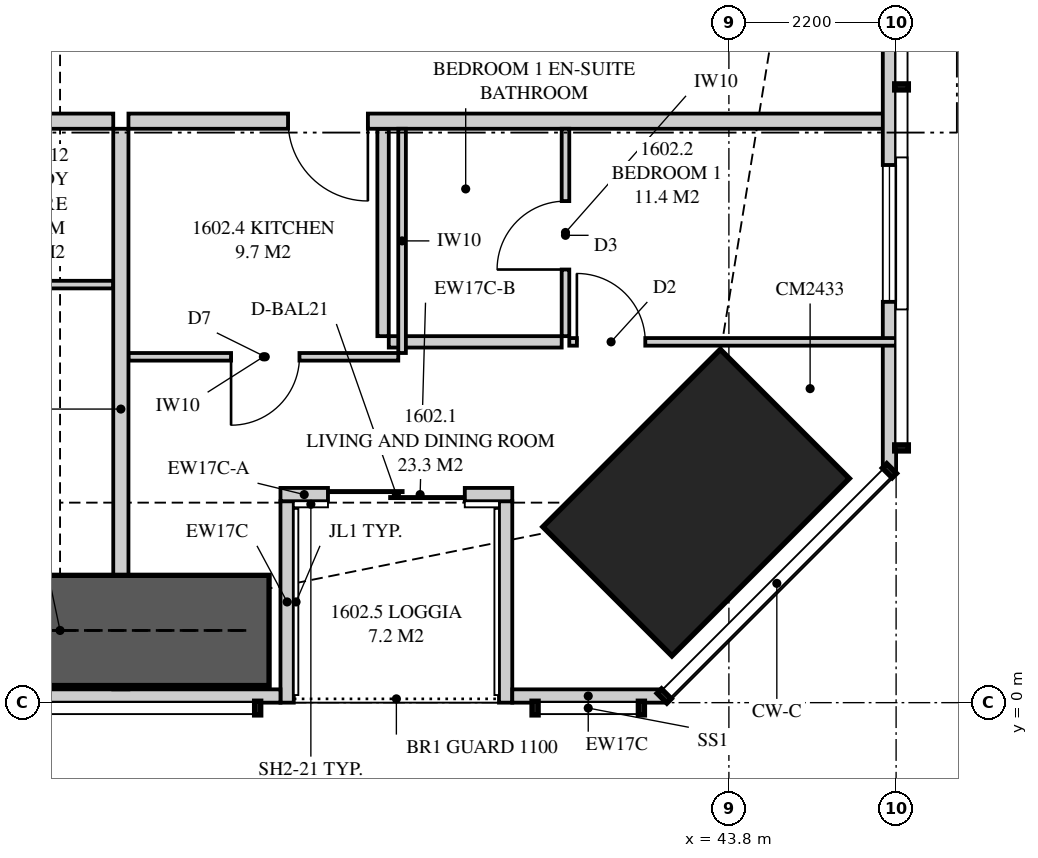
"""IFC4 building model, lengths in metres.
Left out: names, types, materials, properties, quantities, classifications, styles, units other than length and angle.
Written with IfcOpenShell. Run it as: python <this file> out.ifc"""

import sys

from ifc_helpers import new_model, si_unit, direction, frame, frame_2d, origin, origin_2d, place, context, subcontext, project, spatial, polyline, rectangle, outline, extrude, element, fill, save


model = new_model("IFC4")
c1 = context("Model", 3, precision=1e-05, world=origin(), true_north=direction((0.0, 1.0)))
c2 = subcontext(c1, "Body", "Model", "MODEL_VIEW")
j1 = project(units=[si_unit("LENGTHUNIT", "METRE"), si_unit("PLANEANGLEUNIT", "RADIAN")], contexts=[c1])
p1 = place(None, origin())
s1 = spatial("IfcSite", under=j1, at=p1, CompositionType="ELEMENT")
p2 = place(p1, origin())
s2 = spatial("IfcBuilding", under=s1, at=p2, CompositionType="ELEMENT")
p3 = place(p2, frame((0.0, 0.0, 61.2)))
s3 = spatial("IfcBuildingStorey", under=s2, at=p3, CompositionType="ELEMENT", Elevation=61.2)
p4 = place(p3, frame((43.369, 2.631, 0.0), z_axis=(0.0, 0.0, 1.0), x_axis=(-0.707106781187, 0.707106781187, 0.0)))
e1 = element("IfcColumn", 1, at=p4, inside=s3, PredefinedType="COLUMN", context=c2, shape_type="SweptSolid", body=[
    extrude(rectangle(XDim=2.4, YDim=3.3, at=origin_2d()), origin(), (0.0, 0.0, 1.0), 3.35),
])
p5 = place(p3, frame((29.85, 0.087, 0.0), z_axis=(0.0, 0.0, 1.0), x_axis=(1.0, 0.0, 0.0)))
e2 = element("IfcWall", 2, at=p5, inside=s3, PredefinedType="SOLIDWALL", context=c2, shape_type="SweptSolid", body=[
    extrude(outline(polyline([(0.0, 0.0), (8.05, 0.0), (8.05, 3.11), (5.354, 3.11), (5.354, 2.15), (5.306, 2.15), (5.306, 3.11), (5.15, 3.11), (5.15, 2.15), (0.0, 2.15), (0.0, 0.0)])), frame((0.0, 0.087, 0.0), z_axis=(0.0, -1.0, 0.0), x_axis=(1.0, 0.0, 0.0)), (0.0, 0.0, 1.0), 0.175),
])
p6 = place(p5, frame((0.45, 0.0, 0.4)))
e3 = element("IfcOpeningElement", 3, at=p6, cuts=e2, PredefinedType="OPENING", context=c2, shape_type="SweptSolid", body=[
    extrude(rectangle(XDim=1.8, YDim=1.7, at=frame_2d((0.9, 0.85))), frame((0.0, 0.097, 0.0), z_axis=(0.0, -1.0, 0.0), x_axis=(1.0, 0.0, 0.0)), (0.0, 0.0, 1.0), 0.195),
])
p7 = place(p3, frame((40.95, 0.087, 0.0), z_axis=(0.0, 0.0, 1.0), x_axis=(1.0, 0.0, 0.0)))
e4 = element("IfcWall", 4, at=p7, inside=s3, PredefinedType="SOLIDWALL", context=c2, shape_type="SweptSolid", body=[
    extrude(rectangle(XDim=1.999, YDim=0.175, at=frame_2d((1.0, 0.0))), origin(), (0.0, 0.0, 1.0), 3.11),
])
p8 = place(p3, frame((37.9, 2.738, 0.0), z_axis=(0.0, 0.0, 1.0), x_axis=(1.0, 0.0, 0.0)))
e5 = element("IfcWall", 5, at=p8, inside=s3, PredefinedType="SOLIDWALL", context=c2, shape_type="SweptSolid", body=[
    extrude(rectangle(XDim=0.625, YDim=0.175, at=frame_2d((0.312, 0.0))), origin(), (0.0, 0.0, 1.0), 2.51),
])
p9 = place(p3, frame((38.525, 2.738, 0.0), z_axis=(0.0, 0.0, 1.0), x_axis=(1.0, 0.0, 0.0)))
e6 = element("IfcWall", 6, at=p9, inside=s3, PredefinedType="SOLIDWALL", context=c2, shape_type="SweptSolid", body=[
    extrude(rectangle(XDim=2.425, YDim=0.175, at=frame_2d((1.212, 0.0))), origin(), (0.0, 0.0, 1.0), 2.15),
])
p10 = place(p9, origin())
e7 = element("IfcOpeningElement", 7, at=p10, cuts=e6, PredefinedType="OPENING", context=c2, shape_type="SweptSolid", body=[
    extrude(rectangle(XDim=1.8, YDim=2.1, at=frame_2d((0.9, 1.05))), frame((0.0, 0.097, 0.0), z_axis=(0.0, -1.0, 0.0), x_axis=(1.0, 0.0, 0.0)), (0.0, 0.0, 1.0), 0.195),
])
p11 = place(p3, frame((37.988, 0.0, 0.0), z_axis=(0.0, 0.0, 1.0), x_axis=(0.0, 1.0, 0.0)))
e8 = element("IfcWall", 8, at=p11, inside=s3, PredefinedType="SOLIDWALL", context=c2, shape_type="SweptSolid", body=[
    extrude(outline(polyline([(0.0, 0.0), (2.65, 0.0), (2.65, 2.51), (2.384, 2.51), (2.384, 2.15), (0.717, 2.15), (0.717, 3.11), (0.0, 3.11), (0.0, 0.0)])), frame((0.0, 0.087, 0.0), z_axis=(0.0, -1.0, 0.0), x_axis=(1.0, 0.0, 0.0)), (0.0, 0.0, 1.0), 0.175),
])
p12 = place(p3, frame((40.863, 0.0, 0.0), z_axis=(0.0, 0.0, 1.0), x_axis=(0.0, 1.0, 0.0)))
e9 = element("IfcWall", 9, at=p12, inside=s3, PredefinedType="SOLIDWALL", context=c2, shape_type="SweptSolid", body=[
    extrude(outline(polyline([(0.0, 0.0), (2.65, 0.0), (2.65, 2.15), (1.294, 2.15), (1.294, 3.11), (0.0, 3.11), (0.0, 0.0)])), frame((0.0, 0.087, 0.0), z_axis=(0.0, -1.0, 0.0), x_axis=(1.0, 0.0, 0.0)), (0.0, 0.0, 1.0), 0.175),
])
p13 = place(p3, frame((45.913, 3.051, 0.0), z_axis=(0.0, 0.0, 1.0), x_axis=(0.0, 1.0, 0.0)))
e10 = element("IfcWall", 10, at=p13, inside=s3, PredefinedType="SOLIDWALL", context=c2, shape_type="SweptSolid", body=[
    extrude(outline(polyline([(0.0, 0.0), (31.897, 0.0), (31.897, 3.11), (22.167, 3.11), (22.167, 2.15), (22.074, 2.15), (22.074, 3.11), (21.949, 3.11), (21.949, 2.15), (9.949, 2.15), (9.949, 3.11), (9.823, 3.11), (9.823, 2.15), (9.73, 2.15), (9.73, 3.11), (0.0, 3.11), (0.0, 0.0)])), frame((0.0, 0.087, 0.0), z_axis=(0.0, -1.0, 0.0), x_axis=(1.0, 0.0, 0.0)), (0.0, 0.0, 1.0), 0.175),
])
p14 = place(p13, frame((2.222, 0.0, 0.4)))
e11 = element("IfcOpeningElement", 11, at=p14, cuts=e10, PredefinedType="OPENING", context=c2, shape_type="SweptSolid", body=[
    extrude(rectangle(XDim=1.8, YDim=1.7, at=frame_2d((0.9, 0.85))), frame((0.0, 0.097, 0.0), z_axis=(0.0, -1.0, 0.0), x_axis=(1.0, 0.0, 0.0)), (0.0, 0.0, 1.0), 0.195),
])
p15 = place(p13, frame((14.849, 0.0, 0.4)))
e12 = element("IfcOpeningElement", 12, at=p15, cuts=e10, PredefinedType="OPENING", context=c2, shape_type="SweptSolid", body=[
    extrude(rectangle(XDim=1.2, YDim=1.7, at=frame_2d((0.6, 0.85))), frame((0.0, 0.097, 0.0), z_axis=(0.0, -1.0, 0.0), x_axis=(1.0, 0.0, 0.0)), (0.0, 0.0, 1.0), 0.195),
])
p16 = place(p13, frame((27.375, 0.0, 0.4)))
e13 = element("IfcOpeningElement", 13, at=p16, cuts=e10, PredefinedType="OPENING", context=c2, shape_type="SweptSolid", body=[
    extrude(rectangle(XDim=1.8, YDim=1.7, at=frame_2d((0.9, 0.85))), frame((0.0, 0.097, 0.0), z_axis=(0.0, -1.0, 0.0), x_axis=(1.0, 0.0, 0.0)), (0.0, 0.0, 1.0), 0.195),
])
p17 = place(p3, frame((35.8, 0.175, 0.0), z_axis=(0.0, 0.0, 1.0), x_axis=(0.0, 1.0, 0.0)))
e14 = element("IfcWall", 14, at=p17, inside=s3, PredefinedType="PARTITIONING", context=c2, shape_type="SweptSolid", body=[
    extrude(outline(polyline([(0.008, 3.11), (0.0, 3.11), (0.0, 0.0), (0.529, 0.0), (0.529, 0.957), (1.021, 0.957), (1.021, 0.0), (7.375, 0.0), (7.375, 3.11), (3.766, 3.11), (3.766, 2.51), (1.864, 2.51), (1.864, 2.15), (1.021, 2.15), (1.021, 1.193), (0.529, 1.193), (0.529, 2.15), (0.008, 2.15), (0.008, 3.11)])), frame((0.0, 0.1, 0.0), z_axis=(0.0, -1.0, 0.0), x_axis=(1.0, 0.0, 0.0)), (0.0, 0.0, 1.0), 0.2),
])
p18 = place(p3, frame((35.9, 7.65, 0.0), z_axis=(0.0, 0.0, 1.0), x_axis=(1.0, 0.0, 0.0)))
e15 = element("IfcWall", 15, at=p18, inside=s3, PredefinedType="PARTITIONING", context=c2, shape_type="SweptSolid", body=[
    extrude(outline(polyline([(0.0, 0.0), (10.1, 0.0), (10.1, 3.11), (9.204, 3.11), (9.204, 2.15), (7.361, 2.15), (7.361, 3.11), (0.0, 3.11), (0.0, 0.0)])), frame((0.0, 0.1, 0.0), z_axis=(0.0, -1.0, 0.0), x_axis=(1.0, 0.0, 0.0)), (0.0, 0.0, 1.0), 0.2),
])
p19 = place(p18, frame((2.1, 0.0, 0.0)))
e16 = element("IfcOpeningElement", 16, at=p19, cuts=e15, PredefinedType="OPENING", context=c2, shape_type="SweptSolid", body=[
    extrude(rectangle(XDim=1.05, YDim=2.2, at=frame_2d((0.525, 1.1))), frame((0.0, 0.11, 0.0), z_axis=(0.0, -1.0, 0.0), x_axis=(1.0, 0.0, 0.0)), (0.0, 0.0, 1.0), 0.22),
])
p20 = place(p3, frame((41.65, 4.822, 0.0), z_axis=(0.0, 0.0, 1.0), x_axis=(0.0, 1.0, 0.0)))
e17 = element("IfcWall", 17, at=p20, inside=s3, PredefinedType="PARTITIONING", context=c2, shape_type="SweptSolid", body=[
    extrude(rectangle(XDim=2.728, YDim=0.1, at=frame_2d((1.364, 0.0))), origin(), (0.0, 0.0, 1.0), 3.11),
])
p21 = place(p20, frame((0.877, 0.0, 0.0)))
e18 = element("IfcOpeningElement", 18, at=p21, cuts=e17, PredefinedType="OPENING", context=c2, shape_type="SweptSolid", body=[
    extrude(rectangle(XDim=0.9, YDim=2.1, at=frame_2d((0.45, 1.05))), frame((0.0, 0.06, 0.0), z_axis=(0.0, -1.0, 0.0), x_axis=(1.0, 0.0, 0.0)), (0.0, 0.0, 1.0), 0.12),
])
p22 = place(p3, frame((41.7, 4.747, 0.0), z_axis=(0.0, 0.0, 1.0), x_axis=(1.0, 0.0, 0.0)))
e19 = element("IfcWall", 19, at=p22, inside=s3, PredefinedType="PARTITIONING", context=c2, shape_type="SweptSolid", body=[
    extrude(outline(polyline([(0.0, 0.0), (4.3, 0.0), (4.3, 3.11), (2.883, 3.11), (2.883, 2.15), (1.14, 2.15), (1.14, 3.11), (0.0, 3.11), (0.0, 0.0)])), frame((0.0, 0.05, 0.0), z_axis=(0.0, -1.0, 0.0), x_axis=(1.0, 0.0, 0.0)), (0.0, 0.0, 1.0), 0.1),
])
p23 = place(p22, frame((0.1, 0.0, 0.0)))
e20 = element("IfcOpeningElement", 20, at=p23, cuts=e19, PredefinedType="OPENING", context=c2, shape_type="SweptSolid", body=[
    extrude(rectangle(XDim=0.9, YDim=2.1, at=frame_2d((0.45, 1.05))), frame((0.0, 0.06, 0.0), z_axis=(0.0, -1.0, 0.0), x_axis=(1.0, 0.0, 0.0)), (0.0, 0.0, 1.0), 0.12),
])
p24 = place(p3, frame((39.325, 4.747, 0.0), z_axis=(0.0, 0.0, 1.0), x_axis=(1.0, 0.0, 0.0)))
e21 = element("IfcWall", 21, at=p24, inside=s3, PredefinedType="PLUMBINGWALL", context=c2, shape_type="SweptSolid", body=[
    extrude(rectangle(XDim=2.275, YDim=0.15, at=frame_2d((1.138, 0.0))), origin(), (0.0, 0.0, 1.0), 3.11),
])
p25 = place(p3, frame((39.25, 4.822, 0.0), z_axis=(0.0, 0.0, 1.0), x_axis=(0.0, 1.0, 0.0)))
e22 = element("IfcWall", 22, at=p25, inside=s3, PredefinedType="PLUMBINGWALL", context=c2, shape_type="SweptSolid", body=[
    extrude(rectangle(XDim=2.728, YDim=0.15, at=frame_2d((1.364, 0.0))), origin(), (0.0, 0.0, 1.0), 3.11),
])
p26 = place(p3, frame((35.9, 4.55, 0.0), z_axis=(0.0, 0.0, 1.0), x_axis=(1.0, 0.0, 0.0)))
e23 = element("IfcWall", 23, at=p26, inside=s3, PredefinedType="PARTITIONING", context=c2, shape_type="SweptSolid", body=[
    extrude(rectangle(XDim=3.55, YDim=0.1, at=frame_2d((1.775, 0.0))), origin(), (0.0, 0.0, 1.0), 3.11),
])
p27 = place(p26, frame((1.35, 0.0, 0.0)))
e24 = element("IfcOpeningElement", 24, at=p27, cuts=e23, PredefinedType="OPENING", context=c2, shape_type="SweptSolid", body=[
    extrude(rectangle(XDim=0.9, YDim=2.1, at=frame_2d((0.45, 1.05))), frame((0.0, 0.06, 0.0), z_axis=(0.0, -1.0, 0.0), x_axis=(1.0, 0.0, 0.0)), (0.0, 0.0, 1.0), 0.12),
])
p28 = place(p3, frame((39.5, 4.6, 0.0), z_axis=(0.0, 0.0, 1.0), x_axis=(0.0, 1.0, 0.0)))
e25 = element("IfcWall", 25, at=p28, inside=s3, PredefinedType="PARTITIONING", context=c2, shape_type="SweptSolid", body=[
    extrude(rectangle(XDim=2.95, YDim=0.1, at=frame_2d((1.475, 0.0))), origin(), (0.0, 0.0, 1.0), 3.11),
])
p29 = place(p3, frame((24.05, 7.65, 0.0), z_axis=(0.0, 0.0, 1.0), x_axis=(1.0, 0.0, 0.0)))
e26 = element("IfcWall", 26, at=p29, inside=s3, PredefinedType="PARTITIONING", context=c2, shape_type="SweptSolid", body=[
    extrude(outline(polyline([(0.0, 0.0), (11.65, 0.0), (11.65, 3.11), (11.287, 3.11), (11.287, 2.541), (10.613, 2.541), (10.613, 3.11), (0.287, 3.11), (0.287, 2.541), (0.0, 2.541), (0.0, 3.11), (0.0, 0.0)])), frame((0.0, 0.1, 0.0), z_axis=(0.0, -1.0, 0.0), x_axis=(1.0, 0.0, 0.0)), (0.0, 0.0, 1.0), 0.2),
])
p30 = place(p3, frame((35.7, 5.5, 0.0), z_axis=(0.0, 0.0, 1.0), x_axis=(-1.0, 0.0, 0.0)))
e27 = element("IfcWall", 27, at=p30, inside=s3, PredefinedType="PARTITIONING", context=c2, shape_type="SweptSolid", body=[
    extrude(outline(polyline([(0.0, 0.0), (2.0, 0.0), (2.0, 3.11), (0.987, 3.11), (0.987, 2.541), (0.413, 2.541), (0.413, 3.11), (0.0, 3.11), (0.0, 0.0)])), frame((0.0, 0.05, 0.0), z_axis=(0.0, -1.0, 0.0), x_axis=(1.0, 0.0, 0.0)), (0.0, 0.0, 1.0), 0.1),
])
p31 = place(p3, frame((32.25, 0.95, 0.0), z_axis=(0.0, 0.0, 1.0), x_axis=(1.0, 0.0, 0.0)))
e28 = element("IfcWall", 28, at=p31, inside=s3, PredefinedType="SHEAR", context=c2, shape_type="SweptSolid", body=[
    extrude(rectangle(XDim=5.5, YDim=1.45, at=frame_2d((2.75, 0.0))), origin(), (0.0, 0.0, 1.0), 3.35),
])
p32 = place(p10, origin())
e29 = element("IfcDoor", 29, at=p32, inside=s3, OperationType="SLIDING_TO_LEFT", PredefinedType="DOOR", context=c2, shape_type="SweptSolid", body=[
    extrude(rectangle(XDim=1.8, YDim=2.1, at=frame_2d((0.9, 1.05))), frame((0.0, 0.025, 0.0), z_axis=(0.0, -1.0, 0.0), x_axis=(1.0, 0.0, 0.0)), (0.0, 0.0, 1.0), 0.05),
])
fill(e7, e29)
p33 = place(p14, origin())
e30 = element("IfcWindow", 30, at=p33, inside=s3, PartitioningType="SINGLE_PANEL", PredefinedType="WINDOW", context=c2, shape_type="SweptSolid", body=[
    extrude(rectangle(XDim=1.8, YDim=1.7, at=frame_2d((0.9, 0.85))), frame((0.0, 0.03, 0.0), z_axis=(0.0, -1.0, 0.0), x_axis=(1.0, 0.0, 0.0)), (0.0, 0.0, 1.0), 0.06),
])
fill(e11, e30)
p34 = place(p19, frame((1.05, 0.0, 0.0), z_axis=(0.0, 0.0, 1.0), x_axis=(-1.0, 0.0, 0.0)))
e31 = element("IfcDoor", 31, at=p34, inside=s3, OperationType="SINGLE_SWING_LEFT", PredefinedType="DOOR", context=c2, shape_type="SweptSolid", body=[
    extrude(rectangle(XDim=1.05, YDim=2.2, at=frame_2d((0.525, 1.1))), frame((0.0, 0.025, 0.0), z_axis=(0.0, -1.0, 0.0), x_axis=(1.0, 0.0, 0.0)), (0.0, 0.0, 1.0), 0.05),
])
fill(e16, e31)
p35 = place(p23, origin())
e32 = element("IfcDoor", 32, at=p35, inside=s3, OperationType="SINGLE_SWING_LEFT", PredefinedType="DOOR", context=c2, shape_type="SweptSolid", body=[
    extrude(rectangle(XDim=0.9, YDim=2.1, at=frame_2d((0.45, 1.05))), frame((0.0, 0.025, 0.0), z_axis=(0.0, -1.0, 0.0), x_axis=(1.0, 0.0, 0.0)), (0.0, 0.0, 1.0), 0.05),
])
fill(e20, e32)
p36 = place(p21, origin())
e33 = element("IfcDoor", 33, at=p36, inside=s3, OperationType="SINGLE_SWING_LEFT", PredefinedType="DOOR", context=c2, shape_type="SweptSolid", body=[
    extrude(rectangle(XDim=0.9, YDim=2.1, at=frame_2d((0.45, 1.05))), frame((0.0, 0.025, 0.0), z_axis=(0.0, -1.0, 0.0), x_axis=(1.0, 0.0, 0.0)), (0.0, 0.0, 1.0), 0.05),
])
fill(e18, e33)
p37 = place(p27, frame((0.9, 0.0, 0.0), z_axis=(0.0, 0.0, 1.0), x_axis=(-1.0, 0.0, 0.0)))
e34 = element("IfcDoor", 34, at=p37, inside=s3, OperationType="SINGLE_SWING_RIGHT", PredefinedType="DOOR", context=c2, shape_type="SweptSolid", body=[
    extrude(rectangle(XDim=0.9, YDim=2.1, at=frame_2d((0.45, 1.05))), frame((0.0, 0.025, 0.0), z_axis=(0.0, -1.0, 0.0), x_axis=(1.0, 0.0, 0.0)), (0.0, 0.0, 1.0), 0.05),
])
fill(e24, e34)
save(model, sys.argv[1])
